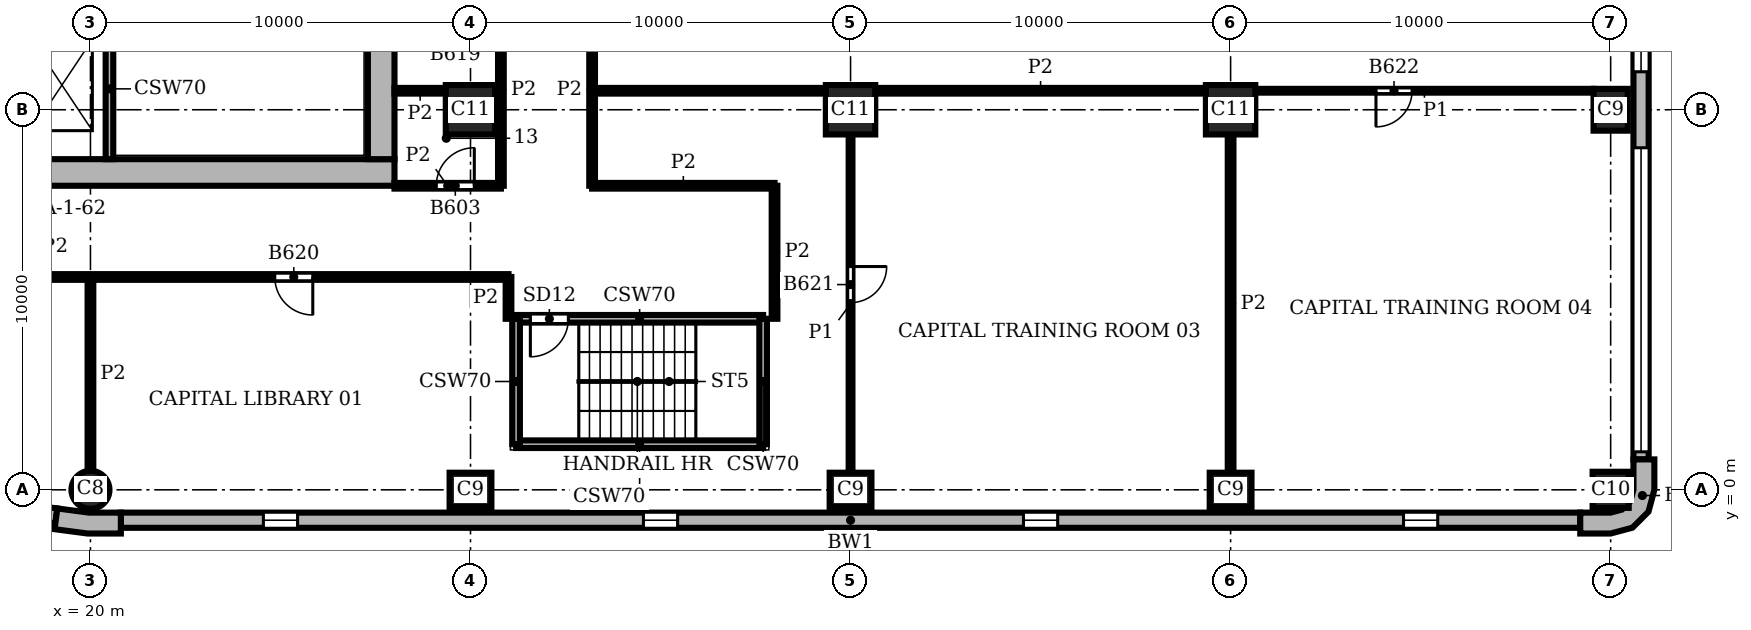
"""IFC4 building model, lengths in metres.
Left out: names, types, materials, properties, quantities, classifications, styles, units other than length and angle.
Written with IfcOpenShell. Run it as: python <this file> out.ifc"""

import sys

from ifc_helpers import new_model, si_unit, direction, frame, frame_2d, origin, origin_2d, place, context, subcontext, project, spatial, polyline, rectangle, circle, outline, extrude, element, fill, save


model = new_model("IFC4")
c1 = context("Model", 3, precision=1e-05, world=origin(), true_north=direction((0.0, 1.0)))
c2 = subcontext(c1, "Body", "Model", "MODEL_VIEW")
j1 = project(units=[si_unit("LENGTHUNIT", "METRE"), si_unit("PLANEANGLEUNIT", "RADIAN")], contexts=[c1])
p1 = place(None, origin())
s1 = spatial("IfcSite", under=j1, at=p1, CompositionType="ELEMENT")
p2 = place(p1, origin())
s2 = spatial("IfcBuilding", under=s1, at=p2, CompositionType="ELEMENT")
p3 = place(p2, frame((0.0, 0.0, 190.2)))
s3 = spatial("IfcBuildingStorey", under=s2, at=p3, CompositionType="ELEMENT", Elevation=190.2)
p4 = place(p3, frame((20.0, 0.0, 0.0), z_axis=(0.0, 0.0, 1.0), x_axis=(1.0, 0.0, 0.0)))
e1 = element("IfcColumn", 1, at=p4, inside=s3, PredefinedType="COLUMN", context=c2, shape_type="SweptSolid", body=[
    extrude(circle(Radius=0.5, at=origin_2d()), origin(), (0.0, 0.0, 1.0), 3.9),
])
for number, where, z_axis, x_axis in (
    (2, (30.0, 0.0, 0.0), (0.0, 0.0, 1.0), (1.0, 0.0, 0.0)),
    (3, (40.0, 0.0, 0.0), (0.0, 0.0, 1.0), (1.0, 0.0, 0.0)),
    (4, (50.0, 0.0, 0.0), (0.0, 0.0, 1.0), (1.0, 0.0, 0.0)),
):
    element("IfcColumn", number, at=place(p3, frame(where, z_axis=z_axis, x_axis=x_axis)), inside=s3, PredefinedType="COLUMN", context=c2, shape_type="SweptSolid", body=[
        extrude(rectangle(XDim=1.1, YDim=0.9, at=origin_2d()), origin(), (0.0, 0.0, 1.0), 3.9),
    ])
p5 = place(p3, frame((60.0, 0.0, 0.0), z_axis=(0.0, 0.0, 1.0), x_axis=(1.0, 0.0, 0.0)))
e5 = element("IfcColumn", 5, at=p5, inside=s3, PredefinedType="COLUMN", context=c2, shape_type="SweptSolid", body=[
    extrude(rectangle(XDim=0.95, YDim=0.95, at=origin_2d()), origin(), (0.0, 0.0, 1.0), 3.9),
])
p6 = place(p3, frame((60.0, 10.0, 0.0), z_axis=(0.0, 0.0, 1.0), x_axis=(0.0, 1.0, 0.0)))
e6 = element("IfcColumn", 6, at=p6, inside=s3, PredefinedType="COLUMN", context=c2, shape_type="SweptSolid", body=[
    extrude(rectangle(XDim=1.1, YDim=0.9, at=origin_2d()), origin(), (0.0, 0.0, 1.0), 3.9),
])
for number, where, z_axis, x_axis in (
    (7, (30.0, 10.0, 0.0), (0.0, 0.0, 1.0), (1.0, 0.0, 0.0)),
    (8, (40.0, 10.0, 0.0), (0.0, 0.0, 1.0), (1.0, 0.0, 0.0)),
    (9, (50.0, 10.0, 0.0), (0.0, 0.0, 1.0), (1.0, 0.0, 0.0)),
):
    element("IfcColumn", number, at=place(p3, frame(where, z_axis=z_axis, x_axis=x_axis)), inside=s3, PredefinedType="COLUMN", context=c2, shape_type="SweptSolid", body=[
        extrude(rectangle(XDim=1.3, YDim=1.3, at=origin_2d()), origin(), (0.0, 0.0, 1.0), 3.9),
    ])
p7 = place(p3, frame((8.0, 8.35, 0.0), z_axis=(0.0, 0.0, 1.0), x_axis=(1.0, 0.0, 0.0)))
e10 = element("IfcWall", 10, at=p7, inside=s3, PredefinedType="SHEAR", context=c2, shape_type="SweptSolid", body=[
    extrude(rectangle(XDim=20.0, YDim=0.7, at=frame_2d((10.0, 0.0))), origin(), (0.0, 0.0, 1.0), 3.9),
])
p8 = place(p3, frame((27.65, 8.7, 0.0), z_axis=(0.0, 0.0, 1.0), x_axis=(0.0, 1.0, 0.0)))
e11 = element("IfcWall", 11, at=p8, inside=s3, PredefinedType="SHEAR", context=c2, shape_type="SweptSolid", body=[
    extrude(rectangle(XDim=18.6, YDim=0.7, at=frame_2d((9.3, 0.0))), origin(), (0.0, 0.0, 1.0), 3.9),
])
p9 = place(p8, frame((4.75, 0.0, 0.0)))
e12 = element("IfcOpeningElement", 12, at=p9, cuts=e11, PredefinedType="OPENING", context=c2, shape_type="SweptSolid", body=[
    extrude(rectangle(XDim=1.6, YDim=2.1, at=frame_2d((0.8, 1.05))), frame((0.0, 0.36, 0.0), z_axis=(0.0, -1.0, 0.0), x_axis=(1.0, 0.0, 0.0)), (0.0, 0.0, 1.0), 0.72),
])
p10 = place(p3, origin())
e13 = element("IfcWall", 13, at=p10, inside=s3, PredefinedType="SOLIDWALL", context=c2, shape_type="SweptSolid", body=[
    extrude(outline(polyline([(19.076, -0.887), (19.057, -1.036), (19.925, -1.15), (20.8, -1.15), (20.8, -1.0), (20.8, -0.6), (19.961, -0.6), (19.128, -0.49), (19.076, -0.887)])), origin(), (0.0, 0.0, 1.0), 3.9),
])
e14 = element("IfcWall", 14, at=p10, inside=s3, PredefinedType="SOLIDWALL", context=c2, shape_type="SweptSolid", body=[
    extrude(outline(polyline([(59.2, -1.0), (59.2, -1.15), (60.0, -1.15), (60.575, -0.996), (60.996, -0.575), (61.15, 0.0), (61.15, 0.8), (61.0, 0.8), (60.6, 0.8), (60.6, 0.0), (60.52, -0.3), (60.3, -0.52), (60.0, -0.6), (59.2, -0.6), (59.2, -1.0)])), origin(), (0.0, 0.0, 1.0), 3.9),
])
p11 = place(p3, frame((20.8, -0.8, 0.0), z_axis=(0.0, 0.0, 1.0), x_axis=(1.0, 0.0, 0.0)))
e15 = element("IfcWall", 15, at=p11, inside=s3, PredefinedType="SOLIDWALL", context=c2, shape_type="SweptSolid", body=[
    extrude(rectangle(XDim=38.4, YDim=0.4, at=frame_2d((19.2, 0.0))), origin(), (0.0, 0.0, 1.0), 3.9),
])
p12 = place(p11, frame((3.75, 0.0, 0.9)))
e16 = element("IfcOpeningElement", 16, at=p12, cuts=e15, PredefinedType="OPENING", context=c2, shape_type="SweptSolid", body=[
    extrude(rectangle(XDim=0.9, YDim=2.35, at=frame_2d((0.45, 1.175))), frame((0.0, 0.21, 0.0), z_axis=(0.0, -1.0, 0.0), x_axis=(1.0, 0.0, 0.0)), (0.0, 0.0, 1.0), 0.42),
])
p13 = place(p11, frame((13.75, 0.0, 0.9)))
e17 = element("IfcOpeningElement", 17, at=p13, cuts=e15, PredefinedType="OPENING", context=c2, shape_type="SweptSolid", body=[
    extrude(rectangle(XDim=0.9, YDim=2.35, at=frame_2d((0.45, 1.175))), frame((0.0, 0.21, 0.0), z_axis=(0.0, -1.0, 0.0), x_axis=(1.0, 0.0, 0.0)), (0.0, 0.0, 1.0), 0.42),
])
p14 = place(p11, frame((23.75, 0.0, 0.9)))
e18 = element("IfcOpeningElement", 18, at=p14, cuts=e15, PredefinedType="OPENING", context=c2, shape_type="SweptSolid", body=[
    extrude(rectangle(XDim=0.9, YDim=2.35, at=frame_2d((0.45, 1.175))), frame((0.0, 0.21, 0.0), z_axis=(0.0, -1.0, 0.0), x_axis=(1.0, 0.0, 0.0)), (0.0, 0.0, 1.0), 0.42),
])
p15 = place(p11, frame((33.75, 0.0, 0.9)))
e19 = element("IfcOpeningElement", 19, at=p15, cuts=e15, PredefinedType="OPENING", context=c2, shape_type="SweptSolid", body=[
    extrude(rectangle(XDim=0.9, YDim=2.35, at=frame_2d((0.45, 1.175))), frame((0.0, 0.21, 0.0), z_axis=(0.0, -1.0, 0.0), x_axis=(1.0, 0.0, 0.0)), (0.0, 0.0, 1.0), 0.42),
])
p16 = place(p3, frame((60.8, 0.8, 0.0), z_axis=(0.0, 0.0, 1.0), x_axis=(0.0, 1.0, 0.0)))
e20 = element("IfcWall", 20, at=p16, inside=s3, PredefinedType="SOLIDWALL", context=c2, shape_type="SweptSolid", body=[
    extrude(rectangle(XDim=28.4, YDim=0.4, at=frame_2d((14.2, 0.0))), origin(), (0.0, 0.0, 1.0), 3.9),
])
p17 = place(p16, frame((0.2, 0.0, 0.9)))
e21 = element("IfcOpeningElement", 21, at=p17, cuts=e20, PredefinedType="OPENING", context=c2, shape_type="SweptSolid", body=[
    extrude(rectangle(XDim=8.0, YDim=2.35, at=frame_2d((4.0, 1.175))), frame((0.0, 0.21, 0.0), z_axis=(0.0, -1.0, 0.0), x_axis=(1.0, 0.0, 0.0)), (0.0, 0.0, 1.0), 0.42),
])
p18 = place(p16, frame((10.2, 0.0, 0.9)))
e22 = element("IfcOpeningElement", 22, at=p18, cuts=e20, PredefinedType="OPENING", context=c2, shape_type="SweptSolid", body=[
    extrude(rectangle(XDim=8.0, YDim=2.35, at=frame_2d((4.0, 1.175))), frame((0.0, 0.21, 0.0), z_axis=(0.0, -1.0, 0.0), x_axis=(1.0, 0.0, 0.0)), (0.0, 0.0, 1.0), 0.42),
])
p19 = place(p16, frame((20.2, 0.0, 0.9)))
e23 = element("IfcOpeningElement", 23, at=p19, cuts=e20, PredefinedType="OPENING", context=c2, shape_type="SweptSolid", body=[
    extrude(rectangle(XDim=8.0, YDim=2.35, at=frame_2d((4.0, 1.175))), frame((0.0, 0.21, 0.0), z_axis=(0.0, -1.0, 0.0), x_axis=(1.0, 0.0, 0.0)), (0.0, 0.0, 1.0), 0.42),
])
p20 = place(p3, frame((15.017, -0.151, 0.0), z_axis=(0.0, 0.0, 1.0), x_axis=(0.991446429508, -0.130514280502, 0.0)))
e24 = element("IfcWall", 24, at=p20, inside=s3, PredefinedType="SOLIDWALL", context=c2, shape_type="SweptSolid", body=[
    extrude(rectangle(XDim=4.121, YDim=0.4, at=frame_2d((2.061, 0.0))), origin(), (0.0, 0.0, 1.0), 3.9),
])
p21 = place(p20, frame((1.611, 0.0, 0.9)))
e25 = element("IfcOpeningElement", 25, at=p21, cuts=e24, PredefinedType="OPENING", context=c2, shape_type="SweptSolid", body=[
    extrude(rectangle(XDim=0.9, YDim=2.35, at=frame_2d((0.45, 1.175))), frame((0.0, 0.21, 0.0), z_axis=(0.0, -1.0, 0.0), x_axis=(1.0, 0.0, 0.0)), (0.0, 0.0, 1.0), 0.42),
])
p22 = place(p3, frame((31.2, 1.2, 0.0), z_axis=(0.0, 0.0, 1.0), x_axis=(1.0, 0.0, 0.0)))
e26 = element("IfcWall", 26, at=p22, inside=s3, PredefinedType="SHEAR", context=c2, shape_type="SweptSolid", body=[
    extrude(rectangle(XDim=6.5, YDim=0.2, at=frame_2d((3.25, 0.0))), origin(), (0.0, 0.0, 1.0), 3.58),
])
p23 = place(p3, frame((31.2, 4.5, 0.0), z_axis=(0.0, 0.0, 1.0), x_axis=(1.0, 0.0, 0.0)))
e27 = element("IfcWall", 27, at=p23, inside=s3, PredefinedType="SHEAR", context=c2, shape_type="SweptSolid", body=[
    extrude(rectangle(XDim=6.5, YDim=0.2, at=frame_2d((3.25, 0.0))), origin(), (0.0, 0.0, 1.0), 3.58),
])
p24 = place(p23, frame((0.375, 0.0, 0.0)))
e28 = element("IfcOpeningElement", 28, at=p24, cuts=e27, PredefinedType="OPENING", context=c2, shape_type="SweptSolid", body=[
    extrude(rectangle(XDim=1.0, YDim=2.1, at=frame_2d((0.5, 1.05))), frame((0.0, 0.11, 0.0), z_axis=(0.0, -1.0, 0.0), x_axis=(1.0, 0.0, 0.0)), (0.0, 0.0, 1.0), 0.22),
])
p25 = place(p3, frame((20.5, 8.7, 0.0), z_axis=(0.0, 0.0, 1.0), x_axis=(0.0, 1.0, 0.0)))
e29 = element("IfcWall", 29, at=p25, inside=s3, PredefinedType="SHEAR", context=c2, shape_type="SweptSolid", body=[
    extrude(rectangle(XDim=3.7, YDim=0.2, at=frame_2d((1.85, 0.0))), origin(), (0.0, 0.0, 1.0), 3.58),
])
for number, where, z_axis, x_axis in (
    (30, (31.2, 1.2, 0.0), (0.0, 0.0, 1.0), (0.0, 1.0, 0.0)),
    (31, (37.7, 1.2, 0.0), (0.0, 0.0, 1.0), (0.0, 1.0, 0.0)),
):
    element("IfcWall", number, at=place(p3, frame(where, z_axis=z_axis, x_axis=x_axis)), inside=s3, PredefinedType="SHEAR", context=c2, shape_type="SweptSolid", body=[
        extrude(rectangle(XDim=3.3, YDim=0.2, at=frame_2d((1.65, 0.0))), origin(), (0.0, 0.0, 1.0), 3.58),
    ])
p26 = place(p3, frame((40.0, 0.45, 0.0), z_axis=(0.0, 0.0, 1.0), x_axis=(0.0, 1.0, 0.0)))
e32 = element("IfcWall", 32, at=p26, inside=s3, PredefinedType="PARTITIONING", context=c2, shape_type="SweptSolid", body=[
    extrude(rectangle(XDim=8.9, YDim=0.1, at=frame_2d((4.45, 0.0))), origin(), (0.0, 0.0, 1.0), 3.58),
])
p27 = place(p26, frame((4.475, 0.0, 0.0)))
e33 = element("IfcOpeningElement", 33, at=p27, cuts=e32, PredefinedType="OPENING", context=c2, shape_type="SweptSolid", body=[
    extrude(rectangle(XDim=0.95, YDim=2.1, at=frame_2d((0.475, 1.05))), frame((0.0, 0.06, 0.0), z_axis=(0.0, -1.0, 0.0), x_axis=(1.0, 0.0, 0.0)), (0.0, 0.0, 1.0), 0.12),
])
p28 = place(p3, frame((50.65, 10.5, 0.0), z_axis=(0.0, 0.0, 1.0), x_axis=(1.0, 0.0, 0.0)))
e34 = element("IfcWall", 34, at=p28, inside=s3, PredefinedType="PARTITIONING", context=c2, shape_type="SweptSolid", body=[
    extrude(rectangle(XDim=8.9, YDim=0.1, at=frame_2d((4.45, 0.0))), origin(), (0.0, 0.0, 1.0), 3.58),
])
p29 = place(p28, frame((3.175, 0.0, 0.0)))
e35 = element("IfcOpeningElement", 35, at=p29, cuts=e34, PredefinedType="OPENING", context=c2, shape_type="SweptSolid", body=[
    extrude(rectangle(XDim=0.95, YDim=2.1, at=frame_2d((0.475, 1.05))), frame((0.0, 0.06, 0.0), z_axis=(0.0, -1.0, 0.0), x_axis=(1.0, 0.0, 0.0)), (0.0, 0.0, 1.0), 0.12),
])
p30 = place(p3, frame((20.0, 0.5, 0.0), z_axis=(0.0, 0.0, 1.0), x_axis=(0.0, 1.0, 0.0)))
e36 = element("IfcWall", 36, at=p30, inside=s3, PredefinedType="PARTITIONING", context=c2, shape_type="SweptSolid", body=[
    extrude(rectangle(XDim=5.1, YDim=0.15, at=frame_2d((2.55, 0.0))), origin(), (0.0, 0.0, 1.0), 3.58),
])
p31 = place(p3, frame((30.8, 8.0, 0.0), z_axis=(0.0, 0.0, 1.0), x_axis=(0.0, 1.0, 0.0)))
e37 = element("IfcWall", 37, at=p31, inside=s3, PredefinedType="PARTITIONING", context=c2, shape_type="SweptSolid", body=[
    extrude(rectangle(XDim=5.05, YDim=0.15, at=frame_2d((2.525, 0.0))), origin(), (0.0, 0.0, 1.0), 3.58),
])
p32 = place(p3, frame((31.0, 4.5, 0.0), z_axis=(0.0, 0.0, 1.0), x_axis=(0.0, 1.0, 0.0)))
e38 = element("IfcWall", 38, at=p32, inside=s3, PredefinedType="PARTITIONING", context=c2, shape_type="SweptSolid", body=[
    extrude(rectangle(XDim=1.1, YDim=0.15, at=frame_2d((0.55, 0.0))), origin(), (0.0, 0.0, 1.0), 3.58),
])
p33 = place(p3, frame((33.2, 8.0, 0.0), z_axis=(0.0, 0.0, 1.0), x_axis=(0.0, 1.0, 0.0)))
e39 = element("IfcWall", 39, at=p33, inside=s3, PredefinedType="PARTITIONING", context=c2, shape_type="SweptSolid", body=[
    extrude(rectangle(XDim=5.05, YDim=0.15, at=frame_2d((2.525, 0.0))), origin(), (0.0, 0.0, 1.0), 3.58),
])
p34 = place(p3, frame((38.0, 4.5, 0.0), z_axis=(0.0, 0.0, 1.0), x_axis=(0.0, 1.0, 0.0)))
e40 = element("IfcWall", 40, at=p34, inside=s3, PredefinedType="PARTITIONING", context=c2, shape_type="SweptSolid", body=[
    extrude(rectangle(XDim=3.5, YDim=0.15, at=frame_2d((1.75, 0.0))), origin(), (0.0, 0.0, 1.0), 3.58),
])
p35 = place(p3, frame((50.0, 0.45, 0.0), z_axis=(0.0, 0.0, 1.0), x_axis=(0.0, 1.0, 0.0)))
e41 = element("IfcWall", 41, at=p35, inside=s3, PredefinedType="PARTITIONING", context=c2, shape_type="SweptSolid", body=[
    extrude(rectangle(XDim=8.9, YDim=0.15, at=frame_2d((4.45, 0.0))), origin(), (0.0, 0.0, 1.0), 3.58),
])
p36 = place(p3, frame((5.6, 5.6, 0.0), z_axis=(0.0, 0.0, 1.0), x_axis=(1.0, 0.0, 0.0)))
e42 = element("IfcWall", 42, at=p36, inside=s3, PredefinedType="PARTITIONING", context=c2, shape_type="SweptSolid", body=[
    extrude(rectangle(XDim=25.4, YDim=0.15, at=frame_2d((12.7, 0.0))), origin(), (0.0, 0.0, 1.0), 3.58),
])
p37 = place(p36, frame((5.1, 0.0, 0.0)))
e43 = element("IfcOpeningElement", 43, at=p37, cuts=e42, PredefinedType="OPENING", context=c2, shape_type="SweptSolid", body=[
    extrude(rectangle(XDim=0.8, YDim=2.1, at=frame_2d((0.4, 1.05))), frame((0.0, 0.085, 0.0), z_axis=(0.0, -1.0, 0.0), x_axis=(1.0, 0.0, 0.0)), (0.0, 0.0, 1.0), 0.17),
])
p38 = place(p36, frame((11.5, 0.0, 0.0)))
e44 = element("IfcOpeningElement", 44, at=p38, cuts=e42, PredefinedType="OPENING", context=c2, shape_type="SweptSolid", body=[
    extrude(rectangle(XDim=1.1, YDim=2.1, at=frame_2d((0.55, 1.05))), frame((0.0, 0.085, 0.0), z_axis=(0.0, -1.0, 0.0), x_axis=(1.0, 0.0, 0.0)), (0.0, 0.0, 1.0), 0.17),
])
p39 = place(p36, frame((19.25, 0.0, 0.0)))
e45 = element("IfcOpeningElement", 45, at=p39, cuts=e42, PredefinedType="OPENING", context=c2, shape_type="SweptSolid", body=[
    extrude(rectangle(XDim=1.0, YDim=2.1, at=frame_2d((0.5, 1.05))), frame((0.0, 0.085, 0.0), z_axis=(0.0, -1.0, 0.0), x_axis=(1.0, 0.0, 0.0)), (0.0, 0.0, 1.0), 0.17),
])
p40 = place(p3, frame((28.0, 8.0, 0.0), z_axis=(0.0, 0.0, 1.0), x_axis=(1.0, 0.0, 0.0)))
e46 = element("IfcWall", 46, at=p40, inside=s3, PredefinedType="PARTITIONING", context=c2, shape_type="SweptSolid", body=[
    extrude(rectangle(XDim=2.8, YDim=0.15, at=frame_2d((1.4, 0.0))), origin(), (0.0, 0.0, 1.0), 3.58),
])
p41 = place(p40, frame((1.1, 0.0, 0.0)))
e47 = element("IfcOpeningElement", 47, at=p41, cuts=e46, PredefinedType="OPENING", context=c2, shape_type="SweptSolid", body=[
    extrude(rectangle(XDim=1.0, YDim=2.1, at=frame_2d((0.5, 1.05))), frame((0.0, 0.085, 0.0), z_axis=(0.0, -1.0, 0.0), x_axis=(1.0, 0.0, 0.0)), (0.0, 0.0, 1.0), 0.17),
])
p42 = place(p3, frame((33.2, 8.0, 0.0), z_axis=(0.0, 0.0, 1.0), x_axis=(1.0, 0.0, 0.0)))
e48 = element("IfcWall", 48, at=p42, inside=s3, PredefinedType="PARTITIONING", context=c2, shape_type="SweptSolid", body=[
    extrude(rectangle(XDim=4.8, YDim=0.15, at=frame_2d((2.4, 0.0))), origin(), (0.0, 0.0, 1.0), 3.58),
])
p43 = place(p3, frame((28.0, 10.5, 0.0), z_axis=(0.0, 0.0, 1.0), x_axis=(1.0, 0.0, 0.0)))
e49 = element("IfcWall", 49, at=p43, inside=s3, PredefinedType="PARTITIONING", context=c2, shape_type="SweptSolid", body=[
    extrude(rectangle(XDim=1.35, YDim=0.15, at=frame_2d((0.675, 0.0))), origin(), (0.0, 0.0, 1.0), 3.58),
])
p44 = place(p3, frame((33.2, 10.5, 0.0), z_axis=(0.0, 0.0, 1.0), x_axis=(1.0, 0.0, 0.0)))
e50 = element("IfcWall", 50, at=p44, inside=s3, PredefinedType="PARTITIONING", context=c2, shape_type="SweptSolid", body=[
    extrude(rectangle(XDim=6.15, YDim=0.15, at=frame_2d((3.075, 0.0))), origin(), (0.0, 0.0, 1.0), 3.58),
])
p45 = place(p3, frame((40.65, 10.5, 0.0), z_axis=(0.0, 0.0, 1.0), x_axis=(1.0, 0.0, 0.0)))
e51 = element("IfcWall", 51, at=p45, inside=s3, PredefinedType="PARTITIONING", context=c2, shape_type="SweptSolid", body=[
    extrude(rectangle(XDim=8.7, YDim=0.15, at=frame_2d((4.35, 0.0))), origin(), (0.0, 0.0, 1.0), 3.58),
])
p46 = place(p12, origin())
e52 = element("IfcWindow", 52, at=p46, inside=s3, PartitioningType="SINGLE_PANEL", PredefinedType="WINDOW", context=c2, shape_type="SweptSolid", body=[
    extrude(rectangle(XDim=0.9, YDim=2.35, at=frame_2d((0.45, 1.175))), frame((0.0, 0.16, 0.0), z_axis=(0.0, -1.0, 0.0), x_axis=(1.0, 0.0, 0.0)), (0.0, 0.0, 1.0), 0.06),
])
fill(e16, e52)
p47 = place(p13, origin())
e53 = element("IfcWindow", 53, at=p47, inside=s3, PartitioningType="SINGLE_PANEL", PredefinedType="WINDOW", context=c2, shape_type="SweptSolid", body=[
    extrude(rectangle(XDim=0.9, YDim=2.35, at=frame_2d((0.45, 1.175))), frame((0.0, 0.16, 0.0), z_axis=(0.0, -1.0, 0.0), x_axis=(1.0, 0.0, 0.0)), (0.0, 0.0, 1.0), 0.06),
])
fill(e17, e53)
p48 = place(p14, origin())
e54 = element("IfcWindow", 54, at=p48, inside=s3, PartitioningType="SINGLE_PANEL", PredefinedType="WINDOW", context=c2, shape_type="SweptSolid", body=[
    extrude(rectangle(XDim=0.9, YDim=2.35, at=frame_2d((0.45, 1.175))), frame((0.0, 0.16, 0.0), z_axis=(0.0, -1.0, 0.0), x_axis=(1.0, 0.0, 0.0)), (0.0, 0.0, 1.0), 0.06),
])
fill(e18, e54)
p49 = place(p15, origin())
e55 = element("IfcWindow", 55, at=p49, inside=s3, PartitioningType="SINGLE_PANEL", PredefinedType="WINDOW", context=c2, shape_type="SweptSolid", body=[
    extrude(rectangle(XDim=0.9, YDim=2.35, at=frame_2d((0.45, 1.175))), frame((0.0, 0.16, 0.0), z_axis=(0.0, -1.0, 0.0), x_axis=(1.0, 0.0, 0.0)), (0.0, 0.0, 1.0), 0.06),
])
fill(e19, e55)
p50 = place(p17, origin())
e56 = element("IfcWindow", 56, at=p50, inside=s3, PartitioningType="SINGLE_PANEL", PredefinedType="WINDOW", context=c2, shape_type="SweptSolid", body=[
    extrude(rectangle(XDim=8.0, YDim=2.35, at=frame_2d((4.0, 1.175))), frame((0.0, 0.16, 0.0), z_axis=(0.0, -1.0, 0.0), x_axis=(1.0, 0.0, 0.0)), (0.0, 0.0, 1.0), 0.06),
])
fill(e21, e56)
p51 = place(p18, origin())
e57 = element("IfcWindow", 57, at=p51, inside=s3, PartitioningType="SINGLE_PANEL", PredefinedType="WINDOW", context=c2, shape_type="SweptSolid", body=[
    extrude(rectangle(XDim=8.0, YDim=2.35, at=frame_2d((4.0, 1.175))), frame((0.0, 0.16, 0.0), z_axis=(0.0, -1.0, 0.0), x_axis=(1.0, 0.0, 0.0)), (0.0, 0.0, 1.0), 0.06),
])
fill(e22, e57)
p52 = place(p24, frame((1.0, 0.0, 0.0), z_axis=(0.0, 0.0, 1.0), x_axis=(-1.0, 0.0, 0.0)))
e58 = element("IfcDoor", 58, at=p52, inside=s3, OperationType="SINGLE_SWING_RIGHT", PredefinedType="DOOR", context=c2, shape_type="SweptSolid", body=[
    extrude(rectangle(XDim=1.0, YDim=2.1, at=frame_2d((0.5, 1.05))), frame((0.0, 0.025, 0.0), z_axis=(0.0, -1.0, 0.0), x_axis=(1.0, 0.0, 0.0)), (0.0, 0.0, 1.0), 0.05),
])
fill(e28, e58)
p53 = place(p41, origin())
e59 = element("IfcDoor", 59, at=p53, inside=s3, OperationType="SINGLE_SWING_RIGHT", PredefinedType="DOOR", context=c2, shape_type="SweptSolid", body=[
    extrude(rectangle(XDim=1.0, YDim=2.1, at=frame_2d((0.5, 1.05))), frame((0.0, 0.025, 0.0), z_axis=(0.0, -1.0, 0.0), x_axis=(1.0, 0.0, 0.0)), (0.0, 0.0, 1.0), 0.05),
])
fill(e47, e59)
p54 = place(p39, frame((1.0, 0.0, 0.0), z_axis=(0.0, 0.0, 1.0), x_axis=(-1.0, 0.0, 0.0)))
e60 = element("IfcDoor", 60, at=p54, inside=s3, OperationType="SINGLE_SWING_LEFT", PredefinedType="DOOR", context=c2, shape_type="SweptSolid", body=[
    extrude(rectangle(XDim=1.0, YDim=2.1, at=frame_2d((0.5, 1.05))), frame((0.0, 0.025, 0.0), z_axis=(0.0, -1.0, 0.0), x_axis=(1.0, 0.0, 0.0)), (0.0, 0.0, 1.0), 0.05),
])
fill(e45, e60)
p55 = place(p27, frame((0.95, 0.0, 0.0), z_axis=(0.0, 0.0, 1.0), x_axis=(-1.0, 0.0, 0.0)))
e61 = element("IfcDoor", 61, at=p55, inside=s3, OperationType="SINGLE_SWING_LEFT", PredefinedType="DOOR", context=c2, shape_type="SweptSolid", body=[
    extrude(rectangle(XDim=0.95, YDim=2.1, at=frame_2d((0.475, 1.05))), frame((0.0, 0.025, 0.0), z_axis=(0.0, -1.0, 0.0), x_axis=(1.0, 0.0, 0.0)), (0.0, 0.0, 1.0), 0.05),
])
fill(e33, e61)
p56 = place(p29, frame((0.95, 0.0, 0.0), z_axis=(0.0, 0.0, 1.0), x_axis=(-1.0, 0.0, 0.0)))
e62 = element("IfcDoor", 62, at=p56, inside=s3, OperationType="SINGLE_SWING_RIGHT", PredefinedType="DOOR", context=c2, shape_type="SweptSolid", body=[
    extrude(rectangle(XDim=0.95, YDim=2.1, at=frame_2d((0.475, 1.05))), frame((0.0, 0.025, 0.0), z_axis=(0.0, -1.0, 0.0), x_axis=(1.0, 0.0, 0.0)), (0.0, 0.0, 1.0), 0.05),
])
fill(e35, e62)
save(model, sys.argv[1])
